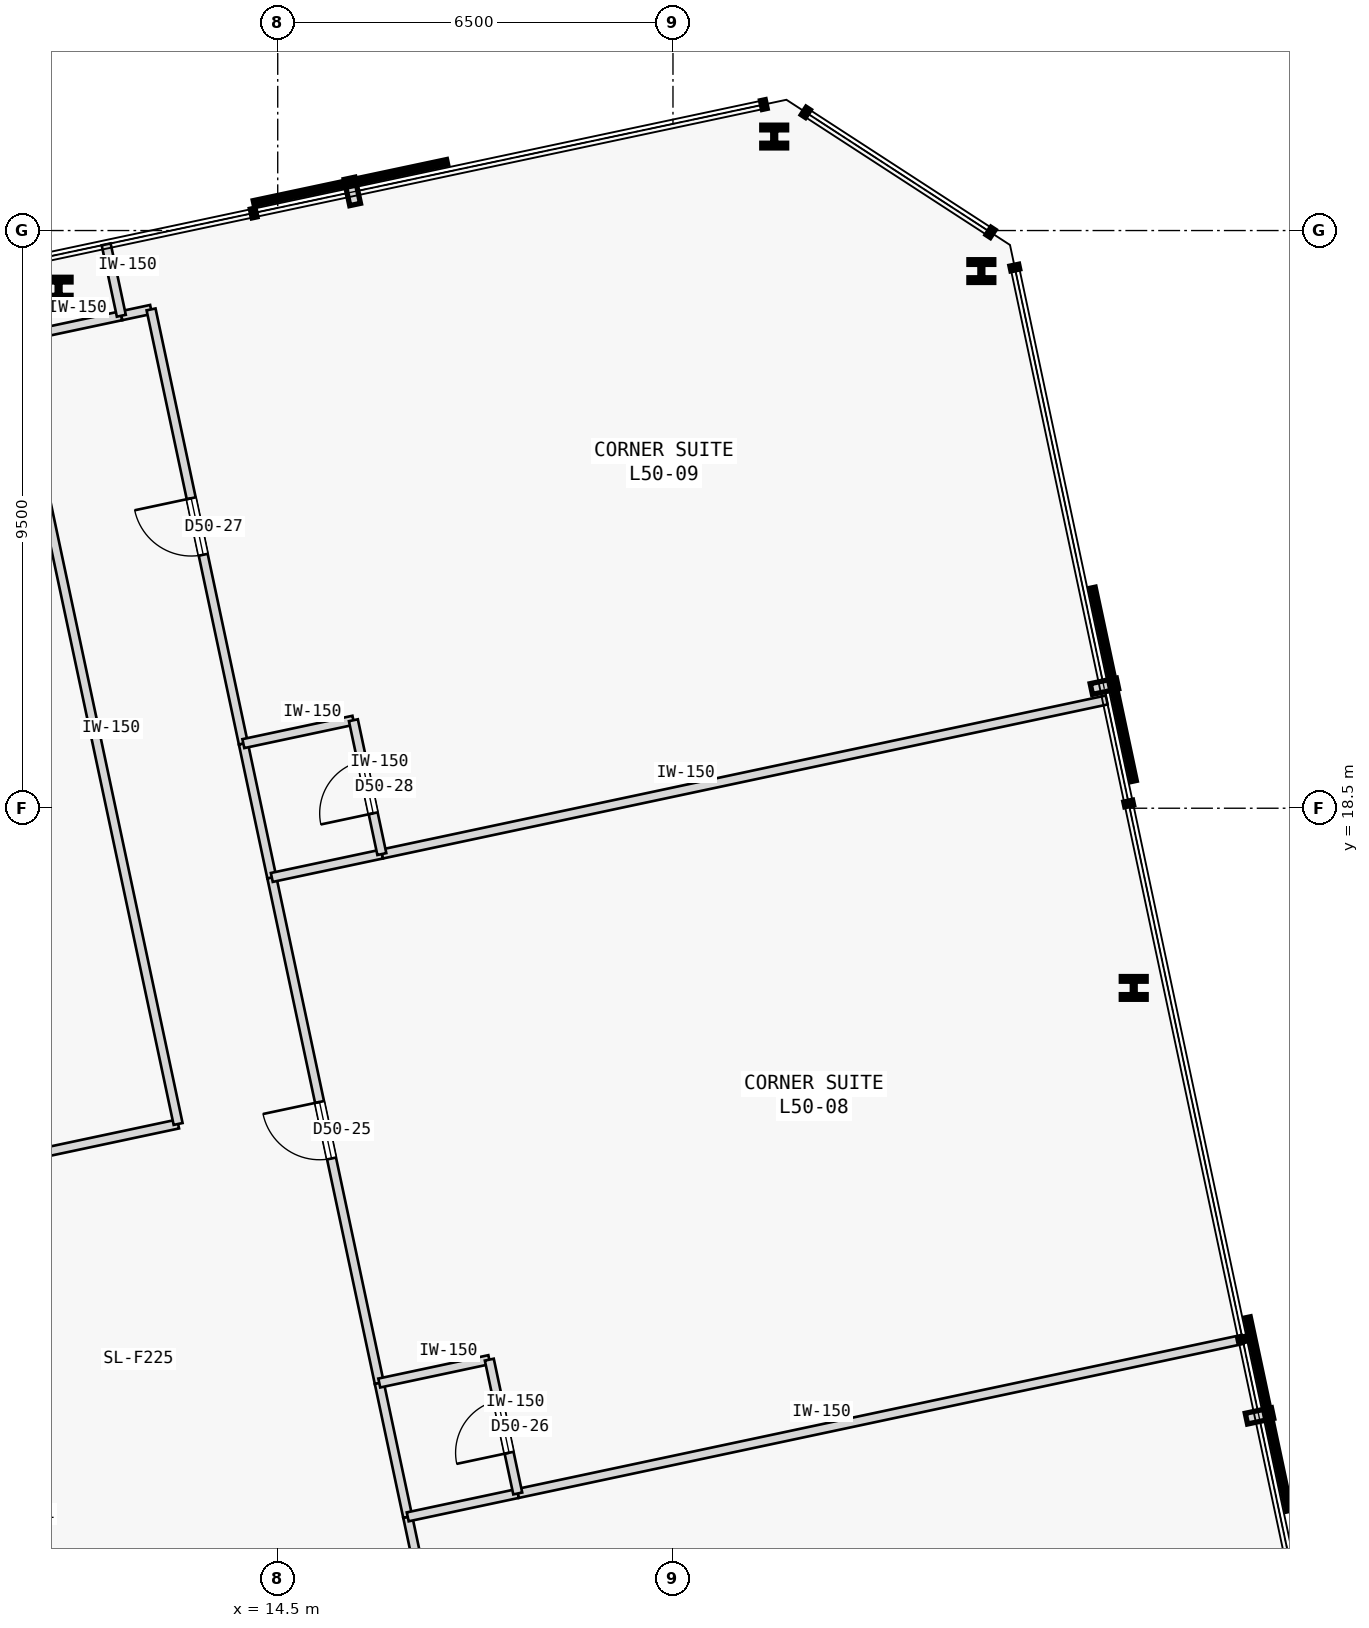
"""IFC4 building model, lengths in metres.
Left out: names, types, materials, properties, quantities, classifications, styles, units other than length and angle.
Written with IfcOpenShell. Run it as: python <this file> out.ifc"""

import sys

from ifc_helpers import new_model, si_unit, direction, frame, frame_2d, origin, origin_2d, place, context, subcontext, project, spatial, rectangle, i_section, extrude, element, fill, save


model = new_model("IFC4")
c1 = context("Model", 3, precision=1e-05, world=origin(), true_north=direction((0.0, 1.0)))
c2 = subcontext(c1, "Body", "Model", "MODEL_VIEW")
j1 = project(units=[si_unit("LENGTHUNIT", "METRE"), si_unit("PLANEANGLEUNIT", "RADIAN")], contexts=[c1])
p1 = place(None, origin())
s1 = spatial("IfcSite", under=j1, at=p1, CompositionType="ELEMENT")
p2 = place(p1, origin())
s2 = spatial("IfcBuilding", under=s1, at=p2, CompositionType="ELEMENT")
p3 = place(p2, frame((0.0, 0.0, 192.2)))
s3 = spatial("IfcBuildingStorey", under=s2, at=p3, CompositionType="ELEMENT", Elevation=192.2)
for number, where, z_axis, x_axis in (
    (1, (28.577, 15.545, 0.0), (0.0, 0.0, 1.0), (1.0, 0.0, 0.0)),
    (2, (26.071, 27.333, 0.0), (0.0, 0.0, 1.0), (1.0, 0.0, 0.0)),
    (3, (22.665, 29.546, 0.0), (0.0, 0.0, 1.0), (1.0, 0.0, 0.0)),
    (4, (10.896, 27.044, 0.0), (0.0, 0.0, 1.0), (1.0, 0.0, 0.0)),
):
    element("IfcColumn", number, at=place(p3, frame(where, z_axis=z_axis, x_axis=x_axis)), inside=s3, PredefinedType="COLUMN", context=c2, shape_type="SweptSolid", body=[
        extrude(i_section(OverallWidth=0.409, OverallDepth=0.374, WebThickness=0.048, FlangeThickness=0.077, FilletRadius=0.015, at=origin_2d()), origin(), (0.0, 0.0, 1.0), 3.4),
    ])
p4 = place(p3, frame((-0.048, 10.564, 0.0), z_axis=(0.0, 0.0, 1.0), x_axis=(0.978149729453, 0.207901675731, 0.0)))
e5 = element("IfcWall", 5, at=p4, inside=s3, PredefinedType="PARTITIONING", context=c2, shape_type="SweptSolid", body=[
    extrude(rectangle(XDim=13.198, YDim=0.15, at=frame_2d((6.599, 0.0))), origin(), (0.0, 0.0, 1.0), 3.175),
])
p5 = place(p4, frame((6.139, 0.0, 0.0)))
e6 = element("IfcOpeningElement", 6, at=p5, cuts=e5, PredefinedType="OPENING", context=c2, shape_type="SweptSolid", body=[
    extrude(rectangle(XDim=0.92, YDim=2.15, at=frame_2d((0.46, 1.075))), frame((0.0, 0.085, 0.0), z_axis=(0.0, -1.0, 0.0), x_axis=(1.0, 0.0, 0.0)), (0.0, 0.0, 1.0), 0.17),
])
p6 = place(p3, frame((12.862, 13.308, 0.0), z_axis=(0.0, 0.0, 1.0), x_axis=(-0.207911421929, 0.978147657888, 0.0)))
e7 = element("IfcWall", 7, at=p6, inside=s3, PredefinedType="PARTITIONING", context=c2, shape_type="SweptSolid", body=[
    extrude(rectangle(XDim=13.195, YDim=0.15, at=frame_2d((6.598, 0.0))), origin(), (0.0, 0.0, 1.0), 3.175),
])
p7 = place(p3, frame((10.118, 26.214, 0.0), z_axis=(0.0, 0.0, 1.0), x_axis=(0.978133353907, 0.20797870558, 0.0)))
e8 = element("IfcWall", 8, at=p7, inside=s3, PredefinedType="PARTITIONING", context=c2, shape_type="SweptSolid", body=[
    extrude(rectangle(XDim=1.85, YDim=0.15, at=frame_2d((0.925, 0.0))), origin(), (0.0, 0.0, 1.0), 3.175),
])
p8 = place(p3, frame((18.405, -1.468, 0.0), z_axis=(0.0, 0.0, 1.0), x_axis=(-0.207888984761, 0.97815242678, 0.0)))
e9 = element("IfcWall", 9, at=p8, inside=s3, PredefinedType="PARTITIONING", context=c2, shape_type="SweptSolid", body=[
    extrude(rectangle(XDim=8.5, YDim=0.15, at=frame_2d((4.25, 0.0))), origin(), (0.0, 0.0, 1.0), 3.175),
])
p9 = place(p8, frame((3.775, 0.0, 0.0)))
e10 = element("IfcOpeningElement", 10, at=p9, cuts=e9, PredefinedType="OPENING", context=c2, shape_type="SweptSolid", body=[
    extrude(rectangle(XDim=0.95, YDim=2.15, at=frame_2d((0.475, 1.075))), frame((0.0, 0.085, 0.0), z_axis=(0.0, -1.0, 0.0), x_axis=(1.0, 0.0, 0.0)), (0.0, 0.0, 1.0), 0.17),
])
p10 = place(p3, frame((16.17, 9.047, 0.0), z_axis=(0.0, 0.0, 1.0), x_axis=(-0.2079164651, 0.978146585917, 0.0)))
e11 = element("IfcWall", 11, at=p10, inside=s3, PredefinedType="PARTITIONING", context=c2, shape_type="SweptSolid", body=[
    extrude(rectangle(XDim=8.5, YDim=0.15, at=frame_2d((4.25, 0.0))), origin(), (0.0, 0.0, 1.0), 3.175),
])
p11 = place(p10, frame((3.775, 0.0, 0.0)))
e12 = element("IfcOpeningElement", 12, at=p11, cuts=e11, PredefinedType="OPENING", context=c2, shape_type="SweptSolid", body=[
    extrude(rectangle(XDim=0.95, YDim=2.15, at=frame_2d((0.475, 1.075))), frame((0.0, 0.085, 0.0), z_axis=(0.0, -1.0, 0.0), x_axis=(1.0, 0.0, 0.0)), (0.0, 0.0, 1.0), 0.17),
])
p12 = place(p3, frame((16.638, 6.847, 0.0), z_axis=(0.0, 0.0, 1.0), x_axis=(-0.207913264065, 0.978147266328, 0.0)))
e13 = element("IfcWall", 13, at=p12, inside=s3, PredefinedType="PARTITIONING", context=c2, shape_type="SweptSolid", body=[
    extrude(rectangle(XDim=2.25, YDim=0.15, at=frame_2d((1.125, 0.0))), origin(), (0.0, 0.0, 1.0), 3.175),
])
p13 = place(p3, frame((11.928, 26.599, 0.0), z_axis=(0.0, 0.0, 1.0), x_axis=(0.97822210712, 0.207560856478, 0.0)))
e14 = element("IfcWall", 14, at=p13, inside=s3, PredefinedType="PARTITIONING", context=c2, shape_type="SweptSolid", body=[
    extrude(rectangle(XDim=0.5, YDim=0.15, at=frame_2d((0.25, 0.0))), origin(), (0.0, 0.0, 1.0), 3.175),
])
p14 = place(p3, frame((13.935, 19.562, 0.0), z_axis=(0.0, 0.0, 1.0), x_axis=(-0.207923154003, 0.978145164088, 0.0)))
e15 = element("IfcWall", 15, at=p14, inside=s3, PredefinedType="PARTITIONING", context=c2, shape_type="SweptSolid", body=[
    extrude(rectangle(XDim=7.3, YDim=0.15, at=frame_2d((3.65, 0.0))), origin(), (0.0, 0.0, 1.0), 3.175),
])
p15 = place(p14, frame((3.175, 0.0, 0.0)))
e16 = element("IfcOpeningElement", 16, at=p15, cuts=e15, PredefinedType="OPENING", context=c2, shape_type="SweptSolid", body=[
    extrude(rectangle(XDim=0.95, YDim=2.15, at=frame_2d((0.475, 1.075))), frame((0.0, 0.085, 0.0), z_axis=(0.0, -1.0, 0.0), x_axis=(1.0, 0.0, 0.0)), (0.0, 0.0, 1.0), 0.17),
])
p16 = place(p3, frame((14.403, 17.362, 0.0), z_axis=(0.0, 0.0, 1.0), x_axis=(-0.207913264065, 0.978147266328, 0.0)))
e17 = element("IfcWall", 17, at=p16, inside=s3, PredefinedType="PARTITIONING", context=c2, shape_type="SweptSolid", body=[
    extrude(rectangle(XDim=2.25, YDim=0.15, at=frame_2d((1.125, 0.0))), origin(), (0.0, 0.0, 1.0), 3.175),
])
p17 = place(p3, frame((11.928, 26.599, 0.0), z_axis=(0.0, 0.0, 1.0), x_axis=(-0.20795853359, 0.978137642823, 0.0)))
e18 = element("IfcWall", 18, at=p17, inside=s3, PredefinedType="PARTITIONING", context=c2, shape_type="SweptSolid", body=[
    extrude(rectangle(XDim=1.2, YDim=0.15, at=frame_2d((0.6, 0.0))), origin(), (0.0, 0.0, 1.0), 3.175),
])
p18 = place(p3, frame((18.447, 7.231, 0.0), z_axis=(0.0, 0.0, 1.0), x_axis=(0.978149634612, 0.207902121941, 0.0)))
e19 = element("IfcWall", 19, at=p18, inside=s3, PredefinedType="PARTITIONING", context=c2, shape_type="SweptSolid", body=[
    extrude(rectangle(XDim=12.187, YDim=0.15, at=frame_2d((6.094, 0.0))), origin(), (0.0, 0.0, 1.0), 3.175),
])
p19 = place(p3, frame((16.638, 6.847, 0.0), z_axis=(0.0, 0.0, 1.0), x_axis=(0.978160192495, 0.207852442415, 0.0)))
e20 = element("IfcWall", 20, at=p19, inside=s3, PredefinedType="PARTITIONING", context=c2, shape_type="SweptSolid", body=[
    extrude(rectangle(XDim=1.85, YDim=0.15, at=frame_2d((0.925, 0.0))), origin(), (0.0, 0.0, 1.0), 3.175),
])
p20 = place(p3, frame((16.17, 9.047, 0.0), z_axis=(0.0, 0.0, 1.0), x_axis=(0.978133353907, 0.20797870558, 0.0)))
e21 = element("IfcWall", 21, at=p20, inside=s3, PredefinedType="PARTITIONING", context=c2, shape_type="SweptSolid", body=[
    extrude(rectangle(XDim=1.85, YDim=0.15, at=frame_2d((0.925, 0.0))), origin(), (0.0, 0.0, 1.0), 3.175),
])
p21 = place(p3, frame((18.447, 7.231, 0.0), z_axis=(0.0, 0.0, 1.0), x_axis=(-0.207891197838, 0.978151956427, 0.0)))
e22 = element("IfcWall", 22, at=p21, inside=s3, PredefinedType="PARTITIONING", context=c2, shape_type="SweptSolid", body=[
    extrude(rectangle(XDim=2.25, YDim=0.15, at=frame_2d((1.125, 0.0))), origin(), (0.0, 0.0, 1.0), 3.175),
])
p22 = place(p21, frame((0.685, 0.0, 0.0)))
e23 = element("IfcOpeningElement", 23, at=p22, cuts=e22, PredefinedType="OPENING", context=c2, shape_type="SweptSolid", body=[
    extrude(rectangle(XDim=0.88, YDim=2.15, at=frame_2d((0.44, 1.075))), frame((0.0, 0.085, 0.0), z_axis=(0.0, -1.0, 0.0), x_axis=(1.0, 0.0, 0.0)), (0.0, 0.0, 1.0), 0.17),
])
p23 = place(p3, frame((16.212, 17.746, 0.0), z_axis=(0.0, 0.0, 1.0), x_axis=(0.978149634612, 0.207902121941, 0.0)))
e24 = element("IfcWall", 24, at=p23, inside=s3, PredefinedType="PARTITIONING", context=c2, shape_type="SweptSolid", body=[
    extrude(rectangle(XDim=12.187, YDim=0.15, at=frame_2d((6.094, 0.0))), origin(), (0.0, 0.0, 1.0), 3.175),
])
for number, where, z_axis, x_axis in (
    (25, (14.403, 17.362, 0.0), (0.0, 0.0, 1.0), (0.978, 0.208, 0.0)),
    (26, (13.935, 19.562, 0.0), (0.0, 0.0, 1.0), (0.978, 0.208, 0.0)),
):
    element("IfcWall", number, at=place(p3, frame(where, z_axis=z_axis, x_axis=x_axis)), inside=s3, PredefinedType="PARTITIONING", context=c2, shape_type="SweptSolid", body=[
        extrude(rectangle(XDim=1.85, YDim=0.15, at=frame_2d((0.925, 0.0))), origin(), (0.0, 0.0, 1.0), 3.175),
    ])
p24 = place(p3, frame((16.212, 17.746, 0.0), z_axis=(0.0, 0.0, 1.0), x_axis=(-0.207913264065, 0.978147266328, 0.0)))
e27 = element("IfcWall", 27, at=p24, inside=s3, PredefinedType="PARTITIONING", context=c2, shape_type="SweptSolid", body=[
    extrude(rectangle(XDim=2.25, YDim=0.15, at=frame_2d((1.125, 0.0))), origin(), (0.0, 0.0, 1.0), 3.175),
])
p25 = place(p24, frame((0.685, 0.0, 0.0)))
e28 = element("IfcOpeningElement", 28, at=p25, cuts=e27, PredefinedType="OPENING", context=c2, shape_type="SweptSolid", body=[
    extrude(rectangle(XDim=0.88, YDim=2.15, at=frame_2d((0.44, 1.075))), frame((0.0, 0.085, 0.0), z_axis=(0.0, -1.0, 0.0), x_axis=(1.0, 0.0, 0.0)), (0.0, 0.0, 1.0), 0.17),
])
p26 = place(p11, origin())
e29 = element("IfcDoor", 29, at=p26, inside=s3, OperationType="SINGLE_SWING_RIGHT", PredefinedType="DOOR", context=c2, shape_type="SweptSolid", body=[
    extrude(rectangle(XDim=0.95, YDim=2.15, at=frame_2d((0.475, 1.075))), frame((0.0, 0.025, 0.0), z_axis=(0.0, -1.0, 0.0), x_axis=(1.0, 0.0, 0.0)), (0.0, 0.0, 1.0), 0.05),
])
fill(e12, e29)
p27 = place(p22, origin())
e30 = element("IfcDoor", 30, at=p27, inside=s3, OperationType="SINGLE_SWING_LEFT", PredefinedType="DOOR", context=c2, shape_type="SweptSolid", body=[
    extrude(rectangle(XDim=0.88, YDim=2.15, at=frame_2d((0.44, 1.075))), frame((0.0, 0.025, 0.0), z_axis=(0.0, -1.0, 0.0), x_axis=(1.0, 0.0, 0.0)), (0.0, 0.0, 1.0), 0.05),
])
fill(e23, e30)
p28 = place(p15, origin())
e31 = element("IfcDoor", 31, at=p28, inside=s3, OperationType="SINGLE_SWING_RIGHT", PredefinedType="DOOR", context=c2, shape_type="SweptSolid", body=[
    extrude(rectangle(XDim=0.95, YDim=2.15, at=frame_2d((0.475, 1.075))), frame((0.0, 0.025, 0.0), z_axis=(0.0, -1.0, 0.0), x_axis=(1.0, 0.0, 0.0)), (0.0, 0.0, 1.0), 0.05),
])
fill(e16, e31)
p29 = place(p25, origin())
e32 = element("IfcDoor", 32, at=p29, inside=s3, OperationType="SINGLE_SWING_LEFT", PredefinedType="DOOR", context=c2, shape_type="SweptSolid", body=[
    extrude(rectangle(XDim=0.88, YDim=2.15, at=frame_2d((0.44, 1.075))), frame((0.0, 0.025, 0.0), z_axis=(0.0, -1.0, 0.0), x_axis=(1.0, 0.0, 0.0)), (0.0, 0.0, 1.0), 0.05),
])
fill(e28, e32)
save(model, sys.argv[1])
